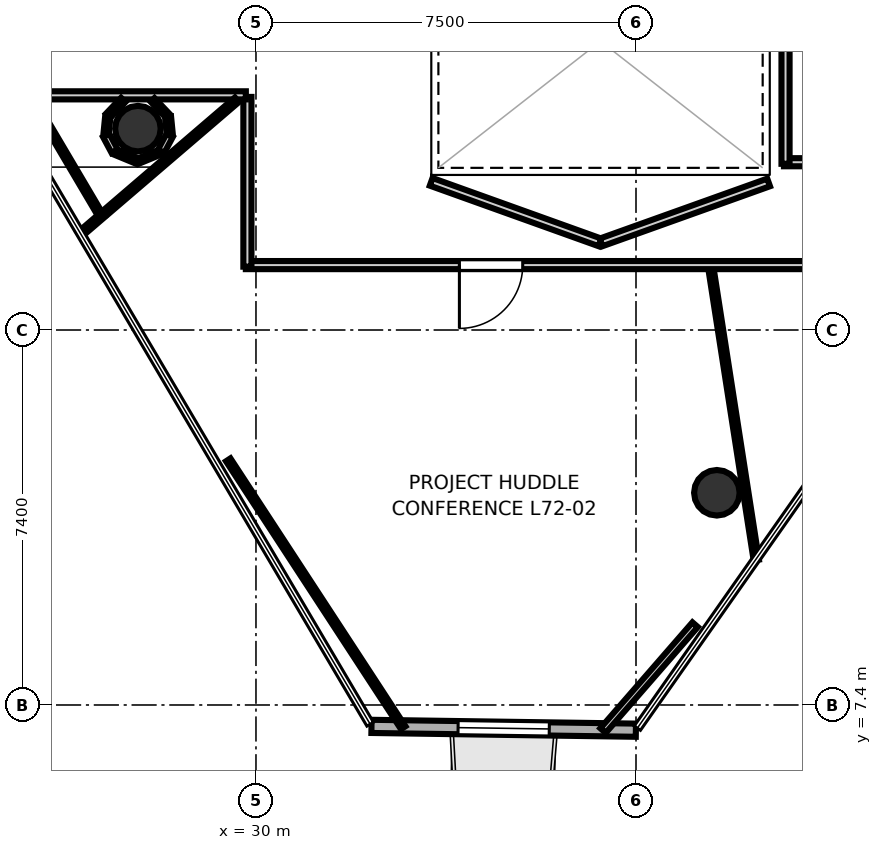
"""IFC4 building model, lengths in metres.
Left out: names, types, materials, properties, quantities, classifications, styles, units other than length and angle.
Written with IfcOpenShell. Run it as: python <this file> out.ifc"""

import sys

from ifc_helpers import new_model, si_unit, direction, frame, frame_2d, origin, origin_2d, place, context, subcontext, project, spatial, rectangle, hollow_circle, extrude, element, fill, save


model = new_model("IFC4")
c1 = context("Model", 3, precision=1e-05, world=origin(), true_north=direction((0.0, 1.0)))
c2 = subcontext(c1, "Body", "Model", "MODEL_VIEW")
j1 = project(units=[si_unit("LENGTHUNIT", "METRE"), si_unit("PLANEANGLEUNIT", "RADIAN")], contexts=[c1])
p1 = place(None, origin())
s1 = spatial("IfcSite", under=j1, at=p1, CompositionType="ELEMENT")
p2 = place(p1, origin())
s2 = spatial("IfcBuilding", under=s1, at=p2, CompositionType="ELEMENT")
p3 = place(p2, frame((0.0, 0.0, 280.6)))
s3 = spatial("IfcBuildingStorey", under=s2, at=p3, CompositionType="ELEMENT", Elevation=280.6)
for number, where, z_axis, x_axis in (
    (1, (27.67, 18.774, -0.23), (0.0, 0.0, 1.0), (1.0, 0.0, 0.0)),
    (2, (39.096, 11.588, -0.23), (0.0, 0.0, 1.0), (1.0, 0.0, 0.0)),
):
    element("IfcColumn", number, at=place(p3, frame(where, z_axis=z_axis, x_axis=x_axis)), inside=s3, PredefinedType="COLUMN", context=c2, shape_type="SweptSolid", body=[
        extrude(hollow_circle(Radius=0.45, WallThickness=0.025, at=origin_2d()), origin(), (0.0, 0.0, 1.0), 3.93),
    ])
p4 = place(p3, frame((32.28, 6.978, 0.0), z_axis=(0.0, 0.0, 1.0), x_axis=(0.999896181959, -0.014409209004, 0.0)))
e3 = element("IfcWall", 3, at=p4, inside=s3, PredefinedType="SOLIDWALL", context=c2, shape_type="SweptSolid", body=[
    extrude(rectangle(XDim=5.219, YDim=0.26, at=frame_2d((2.609, 0.0))), origin(), (0.0, 0.0, 1.0), 3.52),
])
p5 = place(p4, frame((1.709, 0.0, 0.85)))
e4 = element("IfcOpeningElement", 4, at=p5, cuts=e3, PredefinedType="OPENING", context=c2, shape_type="SweptSolid", body=[
    extrude(rectangle(XDim=1.8, YDim=2.1, at=frame_2d((0.9, 1.05))), frame((0.0, 0.14, 0.0), z_axis=(0.0, -1.0, 0.0), x_axis=(1.0, 0.0, 0.0)), (0.0, 0.0, 1.0), 0.28),
])
p6 = place(p3, frame((43.15, 18.111, 0.0), z_axis=(0.0, 0.0, 1.0), x_axis=(-1.0, 0.0, 0.0)))
e5 = element("IfcWall", 5, at=p6, inside=s3, PredefinedType="PARTITIONING", context=c2, shape_type="SweptSolid", body=[
    extrude(rectangle(XDim=2.73, YDim=0.16, at=frame_2d((1.365, 0.0))), origin(), (0.0, 0.0, 1.0), 2.84),
])
p7 = place(p6, frame((0.765, 0.0, 0.0)))
e6 = element("IfcOpeningElement", 6, at=p7, cuts=e5, PredefinedType="OPENING", context=c2, shape_type="SweptSolid", body=[
    extrude(rectangle(XDim=1.2, YDim=2.15, at=frame_2d((0.6, 1.075))), frame((0.0, 0.09, 0.0), z_axis=(0.0, -1.0, 0.0), x_axis=(1.0, 0.0, 0.0)), (0.0, 0.0, 1.0), 0.18),
])
p8 = place(p3, frame((40.451, 18.08, 0.0), z_axis=(0.0, 0.0, 1.0), x_axis=(0.0, 1.0, 0.0)))
e7 = element("IfcWall", 7, at=p8, inside=s3, PredefinedType="PARTITIONING", context=c2, shape_type="SweptSolid", body=[
    extrude(rectangle(XDim=3.32, YDim=0.16, at=frame_2d((1.66, 0.0))), origin(), (0.0, 0.0, 1.0), 2.84),
])
p9 = place(p3, frame((33.458, 17.724, 0.0), z_axis=(0.0, 0.0, 1.0), x_axis=(0.94128854789, -0.337603124408, 0.0)))
e8 = element("IfcWall", 8, at=p9, inside=s3, PredefinedType="PARTITIONING", context=c2, shape_type="SweptSolid", body=[
    extrude(rectangle(XDim=3.54, YDim=0.16, at=frame_2d((1.77, 0.0))), origin(), (0.0, 0.0, 1.0), 2.84),
])
p10 = place(p3, frame((36.81, 16.529, 0.0), z_axis=(0.0, 0.0, 1.0), x_axis=(0.941548344365, 0.33687789364, 0.0)))
e9 = element("IfcWall", 9, at=p10, inside=s3, PredefinedType="PARTITIONING", context=c2, shape_type="SweptSolid", body=[
    extrude(rectangle(XDim=3.513, YDim=0.16, at=frame_2d((1.756, 0.0))), origin(), (0.0, 0.0, 1.0), 2.84),
])
p11 = place(p3, frame((43.965, 16.081, 0.0), z_axis=(0.0, 0.0, 1.0), x_axis=(-1.0, 0.0, 0.0)))
e10 = element("IfcWall", 10, at=p11, inside=s3, PredefinedType="PARTITIONING", context=c2, shape_type="SweptSolid", body=[
    extrude(rectangle(XDim=14.165, YDim=0.16, at=frame_2d((7.083, 0.0))), origin(), (0.0, 0.0, 1.0), 2.84),
])
p12 = place(p11, frame((8.701, 0.0, 0.0)))
e11 = element("IfcOpeningElement", 11, at=p12, cuts=e10, PredefinedType="OPENING", context=c2, shape_type="SweptSolid", body=[
    extrude(rectangle(XDim=1.25, YDim=2.2, at=frame_2d((0.625, 1.1))), frame((0.0, 0.09, 0.0), z_axis=(0.0, -1.0, 0.0), x_axis=(1.0, 0.0, 0.0)), (0.0, 0.0, 1.0), 0.18),
])
p13 = place(p3, frame((29.831, 16.05, 0.0), z_axis=(0.0, 0.0, 1.0), x_axis=(0.0, 1.0, 0.0)))
e12 = element("IfcWall", 12, at=p13, inside=s3, PredefinedType="PARTITIONING", context=c2, shape_type="SweptSolid", body=[
    extrude(rectangle(XDim=3.35, YDim=0.16, at=frame_2d((1.675, 0.0))), origin(), (0.0, 0.0, 1.0), 2.84),
])
p14 = place(p3, frame((29.8, 19.431, 0.0), z_axis=(0.0, 0.0, 1.0), x_axis=(-1.0, 0.0, 0.0)))
e13 = element("IfcWall", 13, at=p14, inside=s3, PredefinedType="PARTITIONING", context=c2, shape_type="SweptSolid", body=[
    extrude(rectangle(XDim=4.894, YDim=0.16, at=frame_2d((2.447, 0.0))), origin(), (0.0, 0.0, 1.0), 2.84),
])
p15 = place(p3, frame((27.381, 19.341, 0.0), z_axis=(0.0, 0.0, 1.0), x_axis=(-0.689047004353, -0.724716652073, 0.0)))
e14 = element("IfcWall", 14, at=p15, inside=s3, PredefinedType="PARTITIONING", context=c2, shape_type="SweptSolid", body=[
    extrude(rectangle(XDim=0.431, YDim=0.12, at=frame_2d((0.216, 0.0))), origin(), (0.0, 0.0, 1.0), 2.84),
])
p16 = place(p3, frame((27.076, 19.01, 0.0), z_axis=(0.0, 0.0, 1.0), x_axis=(-0.097865889817, -0.995199611942, 0.0)))
e15 = element("IfcWall", 15, at=p16, inside=s3, PredefinedType="PARTITIONING", context=c2, shape_type="SweptSolid", body=[
    extrude(rectangle(XDim=0.354, YDim=0.105, at=frame_2d((0.177, 0.0))), origin(), (0.0, 0.0, 1.0), 2.84),
])
p17 = place(p3, frame((27.044, 18.64, 0.0), z_axis=(0.0, 0.0, 1.0), x_axis=(0.471053526925, -0.882104628019, 0.0)))
e16 = element("IfcWall", 16, at=p17, inside=s3, PredefinedType="PARTITIONING", context=c2, shape_type="SweptSolid", body=[
    extrude(rectangle(XDim=0.354, YDim=0.14, at=frame_2d((0.177, 0.0))), origin(), (0.0, 0.0, 1.0), 2.84),
])
p18 = place(p3, frame((27.227, 18.314, 0.0), z_axis=(0.0, 0.0, 1.0), x_axis=(0.924048683901, -0.382274809242, 0.0)))
e17 = element("IfcWall", 17, at=p18, inside=s3, PredefinedType="PARTITIONING", context=c2, shape_type="SweptSolid", body=[
    extrude(rectangle(XDim=0.467, YDim=0.12, at=frame_2d((0.233, 0.0))), origin(), (0.0, 0.0, 1.0), 2.84),
])
p19 = place(p3, frame((27.682, 18.135, 0.0), z_axis=(0.0, 0.0, 1.0), x_axis=(0.924048683901, 0.382274809242, 0.0)))
e18 = element("IfcWall", 18, at=p19, inside=s3, PredefinedType="PARTITIONING", context=c2, shape_type="SweptSolid", body=[
    extrude(rectangle(XDim=0.467, YDim=0.105, at=frame_2d((0.233, 0.0))), origin(), (0.0, 0.0, 1.0), 2.84),
])
p20 = place(p3, frame((28.129, 18.328, 0.0), z_axis=(0.0, 0.0, 1.0), x_axis=(0.471589913721, 0.881817981942, 0.0)))
e19 = element("IfcWall", 19, at=p20, inside=s3, PredefinedType="PARTITIONING", context=c2, shape_type="SweptSolid", body=[
    extrude(rectangle(XDim=0.354, YDim=0.14, at=frame_2d((0.177, 0.0))), origin(), (0.0, 0.0, 1.0), 2.84),
])
p21 = place(p3, frame((28.299, 18.658, 0.0), z_axis=(0.0, 0.0, 1.0), x_axis=(-0.097865889817, 0.995199611942, 0.0)))
e20 = element("IfcWall", 20, at=p21, inside=s3, PredefinedType="PARTITIONING", context=c2, shape_type="SweptSolid", body=[
    extrude(rectangle(XDim=0.354, YDim=0.12, at=frame_2d((0.177, 0.0))), origin(), (0.0, 0.0, 1.0), 2.84),
])
p22 = place(p3, frame((28.256, 19.029, 0.0), z_axis=(0.0, 0.0, 1.0), x_axis=(-0.689344198757, 0.724433969137, 0.0)))
e21 = element("IfcWall", 21, at=p22, inside=s3, PredefinedType="PARTITIONING", context=c2, shape_type="SweptSolid", body=[
    extrude(rectangle(XDim=0.431, YDim=0.105, at=frame_2d((0.216, 0.0))), origin(), (0.0, 0.0, 1.0), 2.84),
])
p23 = place(p3, frame((29.624, 19.344, 0.0), z_axis=(0.0, 0.0, 1.0), x_axis=(-0.759205946939, -0.650850466799, 0.0)))
e22 = element("IfcWall", 22, at=p23, inside=s3, PredefinedType="PARTITIONING", context=c2, shape_type="SweptSolid", body=[
    extrude(rectangle(XDim=4.083, YDim=0.12, at=frame_2d((2.042, 0.0))), origin(), (0.0, 0.0, 1.0), 2.84),
])
p24 = place(p3, frame((26.964, 17.015, 0.0), z_axis=(0.0, 0.0, 1.0), x_axis=(-0.508423474714, 0.861107177046, 0.0)))
e23 = element("IfcWall", 23, at=p24, inside=s3, PredefinedType="PARTITIONING", context=c2, shape_type="SweptSolid", body=[
    extrude(rectangle(XDim=12.265, YDim=0.105, at=frame_2d((6.133, 0.0))), origin(), (0.0, 0.0, 1.0), 2.84),
])
p25 = place(p3, frame((38.987, 15.965, 0.0), z_axis=(0.0, 0.0, 1.0), x_axis=(0.153696911963, -0.988118039129, 0.0)))
e24 = element("IfcWall", 24, at=p25, inside=s3, PredefinedType="PARTITIONING", context=c2, shape_type="SweptSolid", body=[
    extrude(rectangle(XDim=5.772, YDim=0.105, at=frame_2d((2.886, 0.0))), origin(), (0.0, 0.0, 1.0), 2.84),
])
p26 = place(p3, frame((38.667, 8.985, 0.0), z_axis=(0.0, 0.0, 1.0), x_axis=(-0.656292210243, -0.754506815591, 0.0)))
e25 = element("IfcWall", 25, at=p26, inside=s3, PredefinedType="PARTITIONING", context=c2, shape_type="SweptSolid", body=[
    extrude(rectangle(XDim=2.769, YDim=0.14, at=frame_2d((1.385, 0.0))), origin(), (0.0, 0.0, 1.0), 2.84),
])
p27 = place(p3, frame((32.906, 6.952, 0.0), z_axis=(0.0, 0.0, 1.0), x_axis=(-0.546913900382, 0.837188858961, 0.0)))
e26 = element("IfcWall", 26, at=p27, inside=s3, PredefinedType="PARTITIONING", context=c2, shape_type="SweptSolid", body=[
    extrude(rectangle(XDim=6.315, YDim=0.105, at=frame_2d((3.157, 0.0))), origin(), (0.0, 0.0, 1.0), 2.84),
])
p28 = place(p12, origin())
e27 = element("IfcDoor", 27, at=p28, inside=s3, OperationType="SINGLE_SWING_RIGHT", PredefinedType="DOOR", context=c2, shape_type="SweptSolid", body=[
    extrude(rectangle(XDim=1.25, YDim=2.2, at=frame_2d((0.625, 1.1))), frame((0.0, 0.025, 0.0), z_axis=(0.0, -1.0, 0.0), x_axis=(1.0, 0.0, 0.0)), (0.0, 0.0, 1.0), 0.05),
])
fill(e11, e27)
p29 = place(p5, origin())
e28 = element("IfcWindow", 28, at=p29, inside=s3, PartitioningType="SINGLE_PANEL", PredefinedType="WINDOW", context=c2, shape_type="SweptSolid", body=[
    extrude(rectangle(XDim=1.8, YDim=2.1, at=frame_2d((0.9, 1.05))), frame((0.0, 0.03, 0.0), z_axis=(0.0, -1.0, 0.0), x_axis=(1.0, 0.0, 0.0)), (0.0, 0.0, 1.0), 0.06),
])
fill(e4, e28)
save(model, sys.argv[1])
